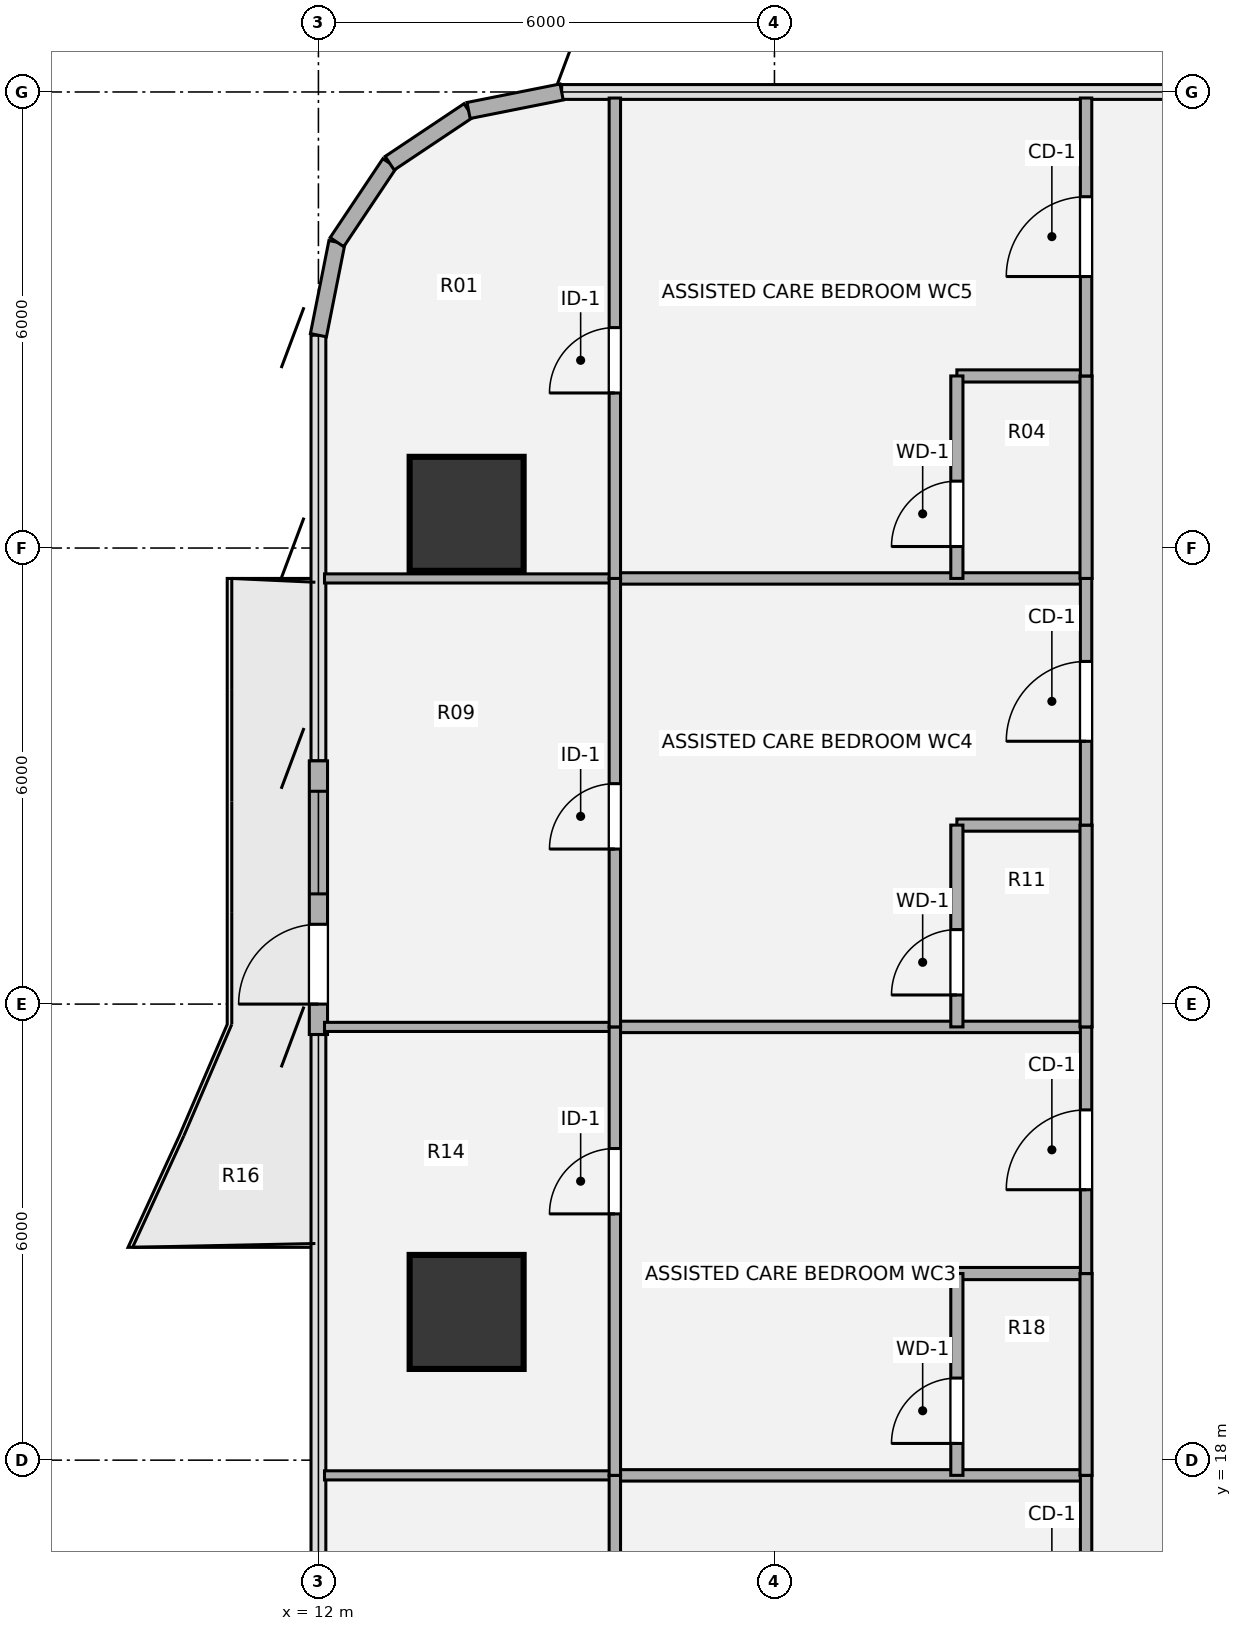
"""IFC4 building model, lengths in metres.
Left out: names, types, materials, properties, quantities, classifications, styles, units other than length and angle.
Written with IfcOpenShell. Run it as: python <this file> out.ifc"""

import sys

from ifc_helpers import new_model, si_unit, direction, frame, frame_2d, origin, origin_2d, place, context, subcontext, project, spatial, rectangle, hollow_circle, extrude, source, transform, mapped, element, fill, save


model = new_model("IFC4")
c1 = context("Model", 3, precision=1e-05, world=origin(), true_north=direction((0.0, 1.0)))
c2 = subcontext(c1, "Body", "Model", "MODEL_VIEW")
j1 = project(units=[si_unit("LENGTHUNIT", "METRE"), si_unit("PLANEANGLEUNIT", "RADIAN")], contexts=[c1])
p1 = place(None, origin())
s1 = spatial("IfcSite", under=j1, at=p1, CompositionType="ELEMENT")
p2 = place(p1, origin())
s2 = spatial("IfcBuilding", under=s1, at=p2, CompositionType="ELEMENT")
p3 = place(p2, frame((0.0, 0.0, 38.34)))
s3 = spatial("IfcBuildingStorey", under=s2, at=p3, CompositionType="ELEMENT", Elevation=38.34)
m1 = source(origin(), c2, "Body", "SweptSolid", [
    extrude(hollow_circle(Radius=0.75, WallThickness=0.05, at=origin_2d()), origin(), (0.0, 0.0, 1.0), 3.78),
])
for number, where, z_axis, x_axis in (
    (1, (13.95, 19.95, 0.0), (0.0, 0.0, 1.0), (1.0, 0.0, 0.0)),
    (2, (13.95, 30.45, 0.0), (0.0, 0.0, 1.0), (1.0, 0.0, 0.0)),
):
    element("IfcColumn", number, at=place(p3, frame(where, z_axis=z_axis, x_axis=x_axis)), inside=s3, PredefinedType="COLUMN", context=c2, shape_type="MappedRepresentation", body=[
        mapped(m1, transform((0.0, 0.0, 0.0), x_axis=(1.0, 0.0, 0.0), y_axis=(0.0, 1.0, 0.0), z_axis=(0.0, 0.0, 1.0), scale=1.0)),
    ])
p4 = place(p3, frame((12.0, 23.6, 0.0), z_axis=(0.0, 0.0, 1.0), x_axis=(0.0, 1.0, 0.0)))
e3 = element("IfcWall", 3, at=p4, inside=s3, PredefinedType="SOLIDWALL", context=c2, shape_type="SweptSolid", body=[
    extrude(rectangle(XDim=3.6, YDim=0.24, at=frame_2d((1.8, 0.0))), origin(), (0.0, 0.0, 1.0), 3.53),
])
p5 = place(p4, frame((0.4, 0.0, 0.0)))
e4 = element("IfcOpeningElement", 4, at=p5, cuts=e3, PredefinedType="OPENING", context=c2, shape_type="SweptSolid", body=[
    extrude(rectangle(XDim=1.05, YDim=2.15, at=origin_2d()), frame((0.525, 0.13, 1.075), z_axis=(0.0, -1.0, 0.0), x_axis=(1.0, 0.0, 0.0)), (0.0, 0.0, 1.0), 0.26),
])
p6 = place(p4, frame((1.85, 0.0, 0.85)))
e5 = element("IfcOpeningElement", 5, at=p6, cuts=e3, PredefinedType="OPENING", context=c2, shape_type="SweptSolid", body=[
    extrude(rectangle(XDim=1.35, YDim=1.35, at=origin_2d()), frame((0.675, 0.13, 0.675), z_axis=(0.0, -1.0, 0.0), x_axis=(1.0, 0.0, 0.0)), (0.0, 0.0, 1.0), 0.26),
])
for number, where, z_axis, x_axis in (
    (6, (12.0, 32.8, 0.0), (0.0, 0.0, 1.0), (0.195, 0.981, 0.0)),
    (7, (12.244, 34.025, 0.0), (0.0, 0.0, 1.0), (0.556, 0.831, 0.0)),
    (8, (12.937, 35.063, 0.0), (0.0, 0.0, 1.0), (0.831, 0.556, 0.0)),
    (9, (13.975, 35.756, 0.0), (0.0, 0.0, 1.0), (0.981, 0.195, 0.0)),
):
    element("IfcWall", number, at=place(p3, frame(where, z_axis=z_axis, x_axis=x_axis)), inside=s3, PredefinedType="SOLIDWALL", context=c2, shape_type="SweptSolid", body=[
        extrude(rectangle(XDim=1.249, YDim=0.215, at=frame_2d((0.624, 0.0))), origin(), (0.0, 0.0, 1.0), 3.53),
    ])
p7 = place(p3, frame((12.08, 17.8, 0.0), z_axis=(0.0, 0.0, 1.0), x_axis=(1.0, 0.0, 0.0)))
e10 = element("IfcWall", 10, at=p7, inside=s3, PredefinedType="PARTITIONING", context=c2, shape_type="SweptSolid", body=[
    extrude(rectangle(XDim=3.82, YDim=0.12, at=frame_2d((1.91, 0.0))), origin(), (0.0, 0.0, 1.0), 3.5),
])
p8 = place(p3, frame((15.9, 17.8, 0.0), z_axis=(0.0, 0.0, 1.0), x_axis=(1.0, 0.0, 0.0)))
e11 = element("IfcWall", 11, at=p8, inside=s3, PredefinedType="PARTITIONING", context=c2, shape_type="SweptSolid", body=[
    extrude(rectangle(XDim=6.2, YDim=0.15, at=frame_2d((3.1, 0.0))), origin(), (0.0, 0.0, 1.0), 3.5),
])
p9 = place(p3, frame((20.4, 20.455, 0.0), z_axis=(0.0, 0.0, 1.0), x_axis=(1.0, 0.0, 0.0)))
e12 = element("IfcWall", 12, at=p9, inside=s3, PredefinedType="PLUMBINGWALL", context=c2, shape_type="SweptSolid", body=[
    extrude(rectangle(XDim=1.7, YDim=0.16, at=frame_2d((0.85, 0.0))), origin(), (0.0, 0.0, 1.0), 2.982),
])
p10 = place(p3, frame((12.08, 23.7, 0.0), z_axis=(0.0, 0.0, 1.0), x_axis=(1.0, 0.0, 0.0)))
e13 = element("IfcWall", 13, at=p10, inside=s3, PredefinedType="PARTITIONING", context=c2, shape_type="SweptSolid", body=[
    extrude(rectangle(XDim=3.82, YDim=0.12, at=frame_2d((1.91, 0.0))), origin(), (0.0, 0.0, 1.0), 2.982),
])
p11 = place(p3, frame((15.9, 23.7, 0.0), z_axis=(0.0, 0.0, 1.0), x_axis=(1.0, 0.0, 0.0)))
e14 = element("IfcWall", 14, at=p11, inside=s3, PredefinedType="PARTITIONING", context=c2, shape_type="SweptSolid", body=[
    extrude(rectangle(XDim=6.2, YDim=0.15, at=frame_2d((3.1, 0.0))), origin(), (0.0, 0.0, 1.0), 2.982),
])
p12 = place(p3, frame((20.4, 26.355, 0.0), z_axis=(0.0, 0.0, 1.0), x_axis=(1.0, 0.0, 0.0)))
e15 = element("IfcWall", 15, at=p12, inside=s3, PredefinedType="PLUMBINGWALL", context=c2, shape_type="SweptSolid", body=[
    extrude(rectangle(XDim=1.7, YDim=0.16, at=frame_2d((0.85, 0.0))), origin(), (0.0, 0.0, 1.0), 2.982),
])
p13 = place(p3, frame((12.08, 29.6, 0.0), z_axis=(0.0, 0.0, 1.0), x_axis=(1.0, 0.0, 0.0)))
e16 = element("IfcWall", 16, at=p13, inside=s3, PredefinedType="PARTITIONING", context=c2, shape_type="SweptSolid", body=[
    extrude(rectangle(XDim=3.82, YDim=0.12, at=frame_2d((1.91, 0.0))), origin(), (0.0, 0.0, 1.0), 2.982),
])
p14 = place(p3, frame((15.9, 29.6, 0.0), z_axis=(0.0, 0.0, 1.0), x_axis=(1.0, 0.0, 0.0)))
e17 = element("IfcWall", 17, at=p14, inside=s3, PredefinedType="PARTITIONING", context=c2, shape_type="SweptSolid", body=[
    extrude(rectangle(XDim=6.2, YDim=0.15, at=frame_2d((3.1, 0.0))), origin(), (0.0, 0.0, 1.0), 2.982),
])
p15 = place(p3, frame((20.4, 32.264, 0.0), z_axis=(0.0, 0.0, 1.0), x_axis=(1.0, 0.0, 0.0)))
e18 = element("IfcWall", 18, at=p15, inside=s3, PredefinedType="PLUMBINGWALL", context=c2, shape_type="SweptSolid", body=[
    extrude(rectangle(XDim=1.7, YDim=0.16, at=frame_2d((0.85, 0.0))), origin(), (0.0, 0.0, 1.0), 3.5),
])
p16 = place(p3, frame((15.9, 11.9, 0.0), z_axis=(0.0, 0.0, 1.0), x_axis=(0.0, 1.0, 0.0)))
e19 = element("IfcWall", 19, at=p16, inside=s3, PredefinedType="PARTITIONING", context=c2, shape_type="SweptSolid", body=[
    extrude(rectangle(XDim=5.9, YDim=0.15, at=frame_2d((2.95, 0.0))), origin(), (0.0, 0.0, 1.0), 3.5),
])
p17 = place(p16, frame((2.14, 0.0, 0.0)))
e20 = element("IfcOpeningElement", 20, at=p17, cuts=e19, PredefinedType="OPENING", context=c2, shape_type="SweptSolid", body=[
    extrude(rectangle(XDim=0.86, YDim=2.1, at=origin_2d()), frame((0.43, 0.085, 1.05), z_axis=(0.0, -1.0, 0.0), x_axis=(1.0, 0.0, 0.0)), (0.0, 0.0, 1.0), 0.17),
])
p18 = place(p3, frame((15.9, 17.8, 0.0), z_axis=(0.0, 0.0, 1.0), x_axis=(0.0, 1.0, 0.0)))
e21 = element("IfcWall", 21, at=p18, inside=s3, PredefinedType="PARTITIONING", context=c2, shape_type="SweptSolid", body=[
    extrude(rectangle(XDim=5.9, YDim=0.15, at=frame_2d((2.95, 0.0))), origin(), (0.0, 0.0, 1.0), 3.5),
])
p19 = place(p18, frame((3.44, 0.0, 0.0)))
e22 = element("IfcOpeningElement", 22, at=p19, cuts=e21, PredefinedType="OPENING", context=c2, shape_type="SweptSolid", body=[
    extrude(rectangle(XDim=0.86, YDim=2.1, at=origin_2d()), frame((0.43, 0.085, 1.05), z_axis=(0.0, -1.0, 0.0), x_axis=(1.0, 0.0, 0.0)), (0.0, 0.0, 1.0), 0.17),
])
p20 = place(p3, frame((15.9, 23.7, 0.0), z_axis=(0.0, 0.0, 1.0), x_axis=(0.0, 1.0, 0.0)))
e23 = element("IfcWall", 23, at=p20, inside=s3, PredefinedType="PARTITIONING", context=c2, shape_type="SweptSolid", body=[
    extrude(rectangle(XDim=5.9, YDim=0.15, at=frame_2d((2.95, 0.0))), origin(), (0.0, 0.0, 1.0), 3.5),
])
p21 = place(p20, frame((2.34, 0.0, 0.0)))
e24 = element("IfcOpeningElement", 24, at=p21, cuts=e23, PredefinedType="OPENING", context=c2, shape_type="SweptSolid", body=[
    extrude(rectangle(XDim=0.86, YDim=2.1, at=origin_2d()), frame((0.43, 0.085, 1.05), z_axis=(0.0, -1.0, 0.0), x_axis=(1.0, 0.0, 0.0)), (0.0, 0.0, 1.0), 0.17),
])
p22 = place(p3, frame((15.9, 29.6, 0.0), z_axis=(0.0, 0.0, 1.0), x_axis=(0.0, 1.0, 0.0)))
e25 = element("IfcWall", 25, at=p22, inside=s3, PredefinedType="PARTITIONING", context=c2, shape_type="SweptSolid", body=[
    extrude(rectangle(XDim=6.32, YDim=0.15, at=frame_2d((3.16, 0.0))), origin(), (0.0, 0.0, 1.0), 3.5),
])
p23 = place(p22, frame((2.44, 0.0, 0.0)))
e26 = element("IfcOpeningElement", 26, at=p23, cuts=e25, PredefinedType="OPENING", context=c2, shape_type="SweptSolid", body=[
    extrude(rectangle(XDim=0.86, YDim=2.1, at=origin_2d()), frame((0.43, 0.085, 1.05), z_axis=(0.0, -1.0, 0.0), x_axis=(1.0, 0.0, 0.0)), (0.0, 0.0, 1.0), 0.17),
])
p24 = place(p3, frame((20.4, 17.8, 0.0), z_axis=(0.0, 0.0, 1.0), x_axis=(0.0, 1.0, 0.0)))
e27 = element("IfcWall", 27, at=p24, inside=s3, PredefinedType="PLUMBINGWALL", context=c2, shape_type="SweptSolid", body=[
    extrude(rectangle(XDim=2.655, YDim=0.16, at=frame_2d((1.328, 0.0))), origin(), (0.0, 0.0, 1.0), 3.5),
])
p25 = place(p24, frame((0.42, 0.0, 0.0)))
e28 = element("IfcOpeningElement", 28, at=p25, cuts=e27, PredefinedType="OPENING", context=c2, shape_type="SweptSolid", body=[
    extrude(rectangle(XDim=0.86, YDim=2.1, at=origin_2d()), frame((0.43, 0.09, 1.05), z_axis=(0.0, -1.0, 0.0), x_axis=(1.0, 0.0, 0.0)), (0.0, 0.0, 1.0), 0.18),
])
p26 = place(p3, frame((20.4, 23.7, 0.0), z_axis=(0.0, 0.0, 1.0), x_axis=(0.0, 1.0, 0.0)))
e29 = element("IfcWall", 29, at=p26, inside=s3, PredefinedType="PLUMBINGWALL", context=c2, shape_type="SweptSolid", body=[
    extrude(rectangle(XDim=2.655, YDim=0.16, at=frame_2d((1.328, 0.0))), origin(), (0.0, 0.0, 1.0), 3.5),
])
p27 = place(p26, frame((0.42, 0.0, 0.0)))
e30 = element("IfcOpeningElement", 30, at=p27, cuts=e29, PredefinedType="OPENING", context=c2, shape_type="SweptSolid", body=[
    extrude(rectangle(XDim=0.86, YDim=2.1, at=origin_2d()), frame((0.43, 0.09, 1.05), z_axis=(0.0, -1.0, 0.0), x_axis=(1.0, 0.0, 0.0)), (0.0, 0.0, 1.0), 0.18),
])
p28 = place(p3, frame((20.4, 29.6, 0.0), z_axis=(0.0, 0.0, 1.0), x_axis=(0.0, 1.0, 0.0)))
e31 = element("IfcWall", 31, at=p28, inside=s3, PredefinedType="PLUMBINGWALL", context=c2, shape_type="SweptSolid", body=[
    extrude(rectangle(XDim=2.664, YDim=0.16, at=frame_2d((1.332, 0.0))), origin(), (0.0, 0.0, 1.0), 3.5),
])
p29 = place(p28, frame((0.42, 0.0, 0.0)))
e32 = element("IfcOpeningElement", 32, at=p29, cuts=e31, PredefinedType="OPENING", context=c2, shape_type="SweptSolid", body=[
    extrude(rectangle(XDim=0.86, YDim=2.1, at=origin_2d()), frame((0.43, 0.09, 1.05), z_axis=(0.0, -1.0, 0.0), x_axis=(1.0, 0.0, 0.0)), (0.0, 0.0, 1.0), 0.18),
])
p30 = place(p3, frame((22.1, 14.555, 0.0), z_axis=(0.0, 0.0, 1.0), x_axis=(0.0, 1.0, 0.0)))
e33 = element("IfcWall", 33, at=p30, inside=s3, PredefinedType="PARTITIONING", context=c2, shape_type="SweptSolid", body=[
    extrude(rectangle(XDim=3.245, YDim=0.15, at=frame_2d((1.623, 0.0))), origin(), (0.0, 0.0, 1.0), 3.5),
])
p31 = place(p30, frame((1.103, 0.0, 0.0)))
e34 = element("IfcOpeningElement", 34, at=p31, cuts=e33, PredefinedType="OPENING", context=c2, shape_type="SweptSolid", body=[
    extrude(rectangle(XDim=1.05, YDim=2.1, at=origin_2d()), frame((0.525, 0.085, 1.05), z_axis=(0.0, -1.0, 0.0), x_axis=(1.0, 0.0, 0.0)), (0.0, 0.0, 1.0), 0.17),
])
p32 = place(p3, frame((22.1, 17.8, 0.0), z_axis=(0.0, 0.0, 1.0), x_axis=(0.0, 1.0, 0.0)))
e35 = element("IfcWall", 35, at=p32, inside=s3, PredefinedType="PLUMBINGWALL", context=c2, shape_type="SweptSolid", body=[
    extrude(rectangle(XDim=2.655, YDim=0.16, at=frame_2d((1.328, 0.0))), origin(), (0.0, 0.0, 1.0), 3.5),
])
p33 = place(p3, frame((22.1, 20.455, 0.0), z_axis=(0.0, 0.0, 1.0), x_axis=(0.0, 1.0, 0.0)))
e36 = element("IfcWall", 36, at=p33, inside=s3, PredefinedType="PARTITIONING", context=c2, shape_type="SweptSolid", body=[
    extrude(rectangle(XDim=3.245, YDim=0.15, at=frame_2d((1.623, 0.0))), origin(), (0.0, 0.0, 1.0), 3.5),
])
p34 = place(p33, frame((1.103, 0.0, 0.0)))
e37 = element("IfcOpeningElement", 37, at=p34, cuts=e36, PredefinedType="OPENING", context=c2, shape_type="SweptSolid", body=[
    extrude(rectangle(XDim=1.05, YDim=2.1, at=origin_2d()), frame((0.525, 0.085, 1.05), z_axis=(0.0, -1.0, 0.0), x_axis=(1.0, 0.0, 0.0)), (0.0, 0.0, 1.0), 0.17),
])
p35 = place(p3, frame((22.1, 23.7, 0.0), z_axis=(0.0, 0.0, 1.0), x_axis=(0.0, 1.0, 0.0)))
e38 = element("IfcWall", 38, at=p35, inside=s3, PredefinedType="PLUMBINGWALL", context=c2, shape_type="SweptSolid", body=[
    extrude(rectangle(XDim=2.655, YDim=0.16, at=frame_2d((1.328, 0.0))), origin(), (0.0, 0.0, 1.0), 3.5),
])
p36 = place(p3, frame((22.1, 26.355, 0.0), z_axis=(0.0, 0.0, 1.0), x_axis=(0.0, 1.0, 0.0)))
e39 = element("IfcWall", 39, at=p36, inside=s3, PredefinedType="PARTITIONING", context=c2, shape_type="SweptSolid", body=[
    extrude(rectangle(XDim=3.245, YDim=0.15, at=frame_2d((1.623, 0.0))), origin(), (0.0, 0.0, 1.0), 3.5),
])
p37 = place(p36, frame((1.103, 0.0, 0.0)))
e40 = element("IfcOpeningElement", 40, at=p37, cuts=e39, PredefinedType="OPENING", context=c2, shape_type="SweptSolid", body=[
    extrude(rectangle(XDim=1.05, YDim=2.1, at=origin_2d()), frame((0.525, 0.085, 1.05), z_axis=(0.0, -1.0, 0.0), x_axis=(1.0, 0.0, 0.0)), (0.0, 0.0, 1.0), 0.17),
])
p38 = place(p3, frame((22.1, 29.6, 0.0), z_axis=(0.0, 0.0, 1.0), x_axis=(0.0, 1.0, 0.0)))
e41 = element("IfcWall", 41, at=p38, inside=s3, PredefinedType="PLUMBINGWALL", context=c2, shape_type="SweptSolid", body=[
    extrude(rectangle(XDim=2.664, YDim=0.16, at=frame_2d((1.332, 0.0))), origin(), (0.0, 0.0, 1.0), 3.5),
])
p39 = place(p3, frame((22.1, 32.264, 0.0), z_axis=(0.0, 0.0, 1.0), x_axis=(0.0, 1.0, 0.0)))
e42 = element("IfcWall", 42, at=p39, inside=s3, PredefinedType="PARTITIONING", context=c2, shape_type="SweptSolid", body=[
    extrude(rectangle(XDim=3.657, YDim=0.15, at=frame_2d((1.828, 0.0))), origin(), (0.0, 0.0, 1.0), 3.5),
])
p40 = place(p39, frame((1.308, 0.0, 0.0)))
e43 = element("IfcOpeningElement", 43, at=p40, cuts=e42, PredefinedType="OPENING", context=c2, shape_type="SweptSolid", body=[
    extrude(rectangle(XDim=1.05, YDim=2.1, at=origin_2d()), frame((0.525, 0.085, 1.05), z_axis=(0.0, -1.0, 0.0), x_axis=(1.0, 0.0, 0.0)), (0.0, 0.0, 1.0), 0.17),
])
m2 = source(origin(), c2, "Body", "SweptSolid", [
    extrude(rectangle(XDim=1.05, YDim=2.15, at=origin_2d()), frame((0.525, 0.025, 1.075), z_axis=(0.0, -1.0, 0.0), x_axis=(1.0, 0.0, 0.0)), (0.0, 0.0, 1.0), 0.05),
])
p41 = place(p5, origin())
e44 = element("IfcDoor", 44, at=p41, inside=s3, OperationType="SINGLE_SWING_LEFT", PredefinedType="DOOR", context=c2, shape_type="MappedRepresentation", body=[
    mapped(m2, transform((0.0, 0.0, 0.0), x_axis=(1.0, 0.0, 0.0), y_axis=(0.0, 1.0, 0.0), z_axis=(0.0, 0.0, 1.0), scale=1.0)),
])
fill(e4, e44)
m3 = source(origin(), c2, "Body", "SweptSolid", [
    extrude(rectangle(XDim=1.35, YDim=1.35, at=origin_2d()), frame((0.675, 0.03, 0.675), z_axis=(0.0, -1.0, 0.0), x_axis=(1.0, 0.0, 0.0)), (0.0, 0.0, 1.0), 0.06),
])
p42 = place(p6, origin())
e45 = element("IfcWindow", 45, at=p42, inside=s3, PartitioningType="SINGLE_PANEL", PredefinedType="WINDOW", context=c2, shape_type="MappedRepresentation", body=[
    mapped(m3, transform((0.0, 0.0, 0.0), x_axis=(1.0, 0.0, 0.0), y_axis=(0.0, 1.0, 0.0), z_axis=(0.0, 0.0, 1.0), scale=1.0)),
])
fill(e5, e45)
m4 = source(origin(), c2, "Body", "SweptSolid", [
    extrude(rectangle(XDim=0.86, YDim=2.1, at=origin_2d()), frame((0.43, 0.025, 1.05), z_axis=(0.0, -1.0, 0.0), x_axis=(1.0, 0.0, 0.0)), (0.0, 0.0, 1.0), 0.05),
])
p43 = place(p19, origin())
e46 = element("IfcDoor", 46, at=p43, inside=s3, OperationType="SINGLE_SWING_LEFT", PredefinedType="DOOR", context=c2, shape_type="MappedRepresentation", body=[
    mapped(m4, transform((0.0, 0.0, 0.0), x_axis=(1.0, 0.0, 0.0), y_axis=(0.0, 1.0, 0.0), z_axis=(0.0, 0.0, 1.0), scale=1.0)),
])
fill(e22, e46)
p44 = place(p21, origin())
e47 = element("IfcDoor", 47, at=p44, inside=s3, OperationType="SINGLE_SWING_LEFT", PredefinedType="DOOR", context=c2, shape_type="MappedRepresentation", body=[
    mapped(m4, transform((0.0, 0.0, 0.0), x_axis=(1.0, 0.0, 0.0), y_axis=(0.0, 1.0, 0.0), z_axis=(0.0, 0.0, 1.0), scale=1.0)),
])
fill(e24, e47)
p45 = place(p23, origin())
e48 = element("IfcDoor", 48, at=p45, inside=s3, OperationType="SINGLE_SWING_LEFT", PredefinedType="DOOR", context=c2, shape_type="MappedRepresentation", body=[
    mapped(m4, transform((0.0, 0.0, 0.0), x_axis=(1.0, 0.0, 0.0), y_axis=(0.0, 1.0, 0.0), z_axis=(0.0, 0.0, 1.0), scale=1.0)),
])
fill(e26, e48)
m5 = source(origin(), c2, "Body", "SweptSolid", [
    extrude(rectangle(XDim=0.86, YDim=2.1, at=origin_2d()), frame((0.43, 0.025, 1.05), z_axis=(0.0, -1.0, 0.0), x_axis=(1.0, 0.0, 0.0)), (0.0, 0.0, 1.0), 0.05),
])
p46 = place(p25, origin())
e49 = element("IfcDoor", 49, at=p46, inside=s3, OperationType="SINGLE_SWING_LEFT", PredefinedType="DOOR", context=c2, shape_type="MappedRepresentation", body=[
    mapped(m5, transform((0.0, 0.0, 0.0), x_axis=(1.0, 0.0, 0.0), y_axis=(0.0, 1.0, 0.0), z_axis=(0.0, 0.0, 1.0), scale=1.0)),
])
fill(e28, e49)
p47 = place(p27, origin())
e50 = element("IfcDoor", 50, at=p47, inside=s3, OperationType="SINGLE_SWING_LEFT", PredefinedType="DOOR", context=c2, shape_type="MappedRepresentation", body=[
    mapped(m5, transform((0.0, 0.0, 0.0), x_axis=(1.0, 0.0, 0.0), y_axis=(0.0, 1.0, 0.0), z_axis=(0.0, 0.0, 1.0), scale=1.0)),
])
fill(e30, e50)
p48 = place(p29, origin())
e51 = element("IfcDoor", 51, at=p48, inside=s3, OperationType="SINGLE_SWING_LEFT", PredefinedType="DOOR", context=c2, shape_type="MappedRepresentation", body=[
    mapped(m5, transform((0.0, 0.0, 0.0), x_axis=(1.0, 0.0, 0.0), y_axis=(0.0, 1.0, 0.0), z_axis=(0.0, 0.0, 1.0), scale=1.0)),
])
fill(e32, e51)
m6 = source(origin(), c2, "Body", "SweptSolid", [
    extrude(rectangle(XDim=1.05, YDim=2.1, at=origin_2d()), frame((0.525, 0.025, 1.05), z_axis=(0.0, -1.0, 0.0), x_axis=(1.0, 0.0, 0.0)), (0.0, 0.0, 1.0), 0.05),
])
p49 = place(p34, origin())
e52 = element("IfcDoor", 52, at=p49, inside=s3, OperationType="SINGLE_SWING_LEFT", PredefinedType="DOOR", context=c2, shape_type="MappedRepresentation", body=[
    mapped(m6, transform((0.0, 0.0, 0.0), x_axis=(1.0, 0.0, 0.0), y_axis=(0.0, 1.0, 0.0), z_axis=(0.0, 0.0, 1.0), scale=1.0)),
])
fill(e37, e52)
p50 = place(p37, origin())
e53 = element("IfcDoor", 53, at=p50, inside=s3, OperationType="SINGLE_SWING_LEFT", PredefinedType="DOOR", context=c2, shape_type="MappedRepresentation", body=[
    mapped(m6, transform((0.0, 0.0, 0.0), x_axis=(1.0, 0.0, 0.0), y_axis=(0.0, 1.0, 0.0), z_axis=(0.0, 0.0, 1.0), scale=1.0)),
])
fill(e40, e53)
p51 = place(p40, origin())
e54 = element("IfcDoor", 54, at=p51, inside=s3, OperationType="SINGLE_SWING_LEFT", PredefinedType="DOOR", context=c2, shape_type="MappedRepresentation", body=[
    mapped(m6, transform((0.0, 0.0, 0.0), x_axis=(1.0, 0.0, 0.0), y_axis=(0.0, 1.0, 0.0), z_axis=(0.0, 0.0, 1.0), scale=1.0)),
])
fill(e43, e54)
save(model, sys.argv[1])
